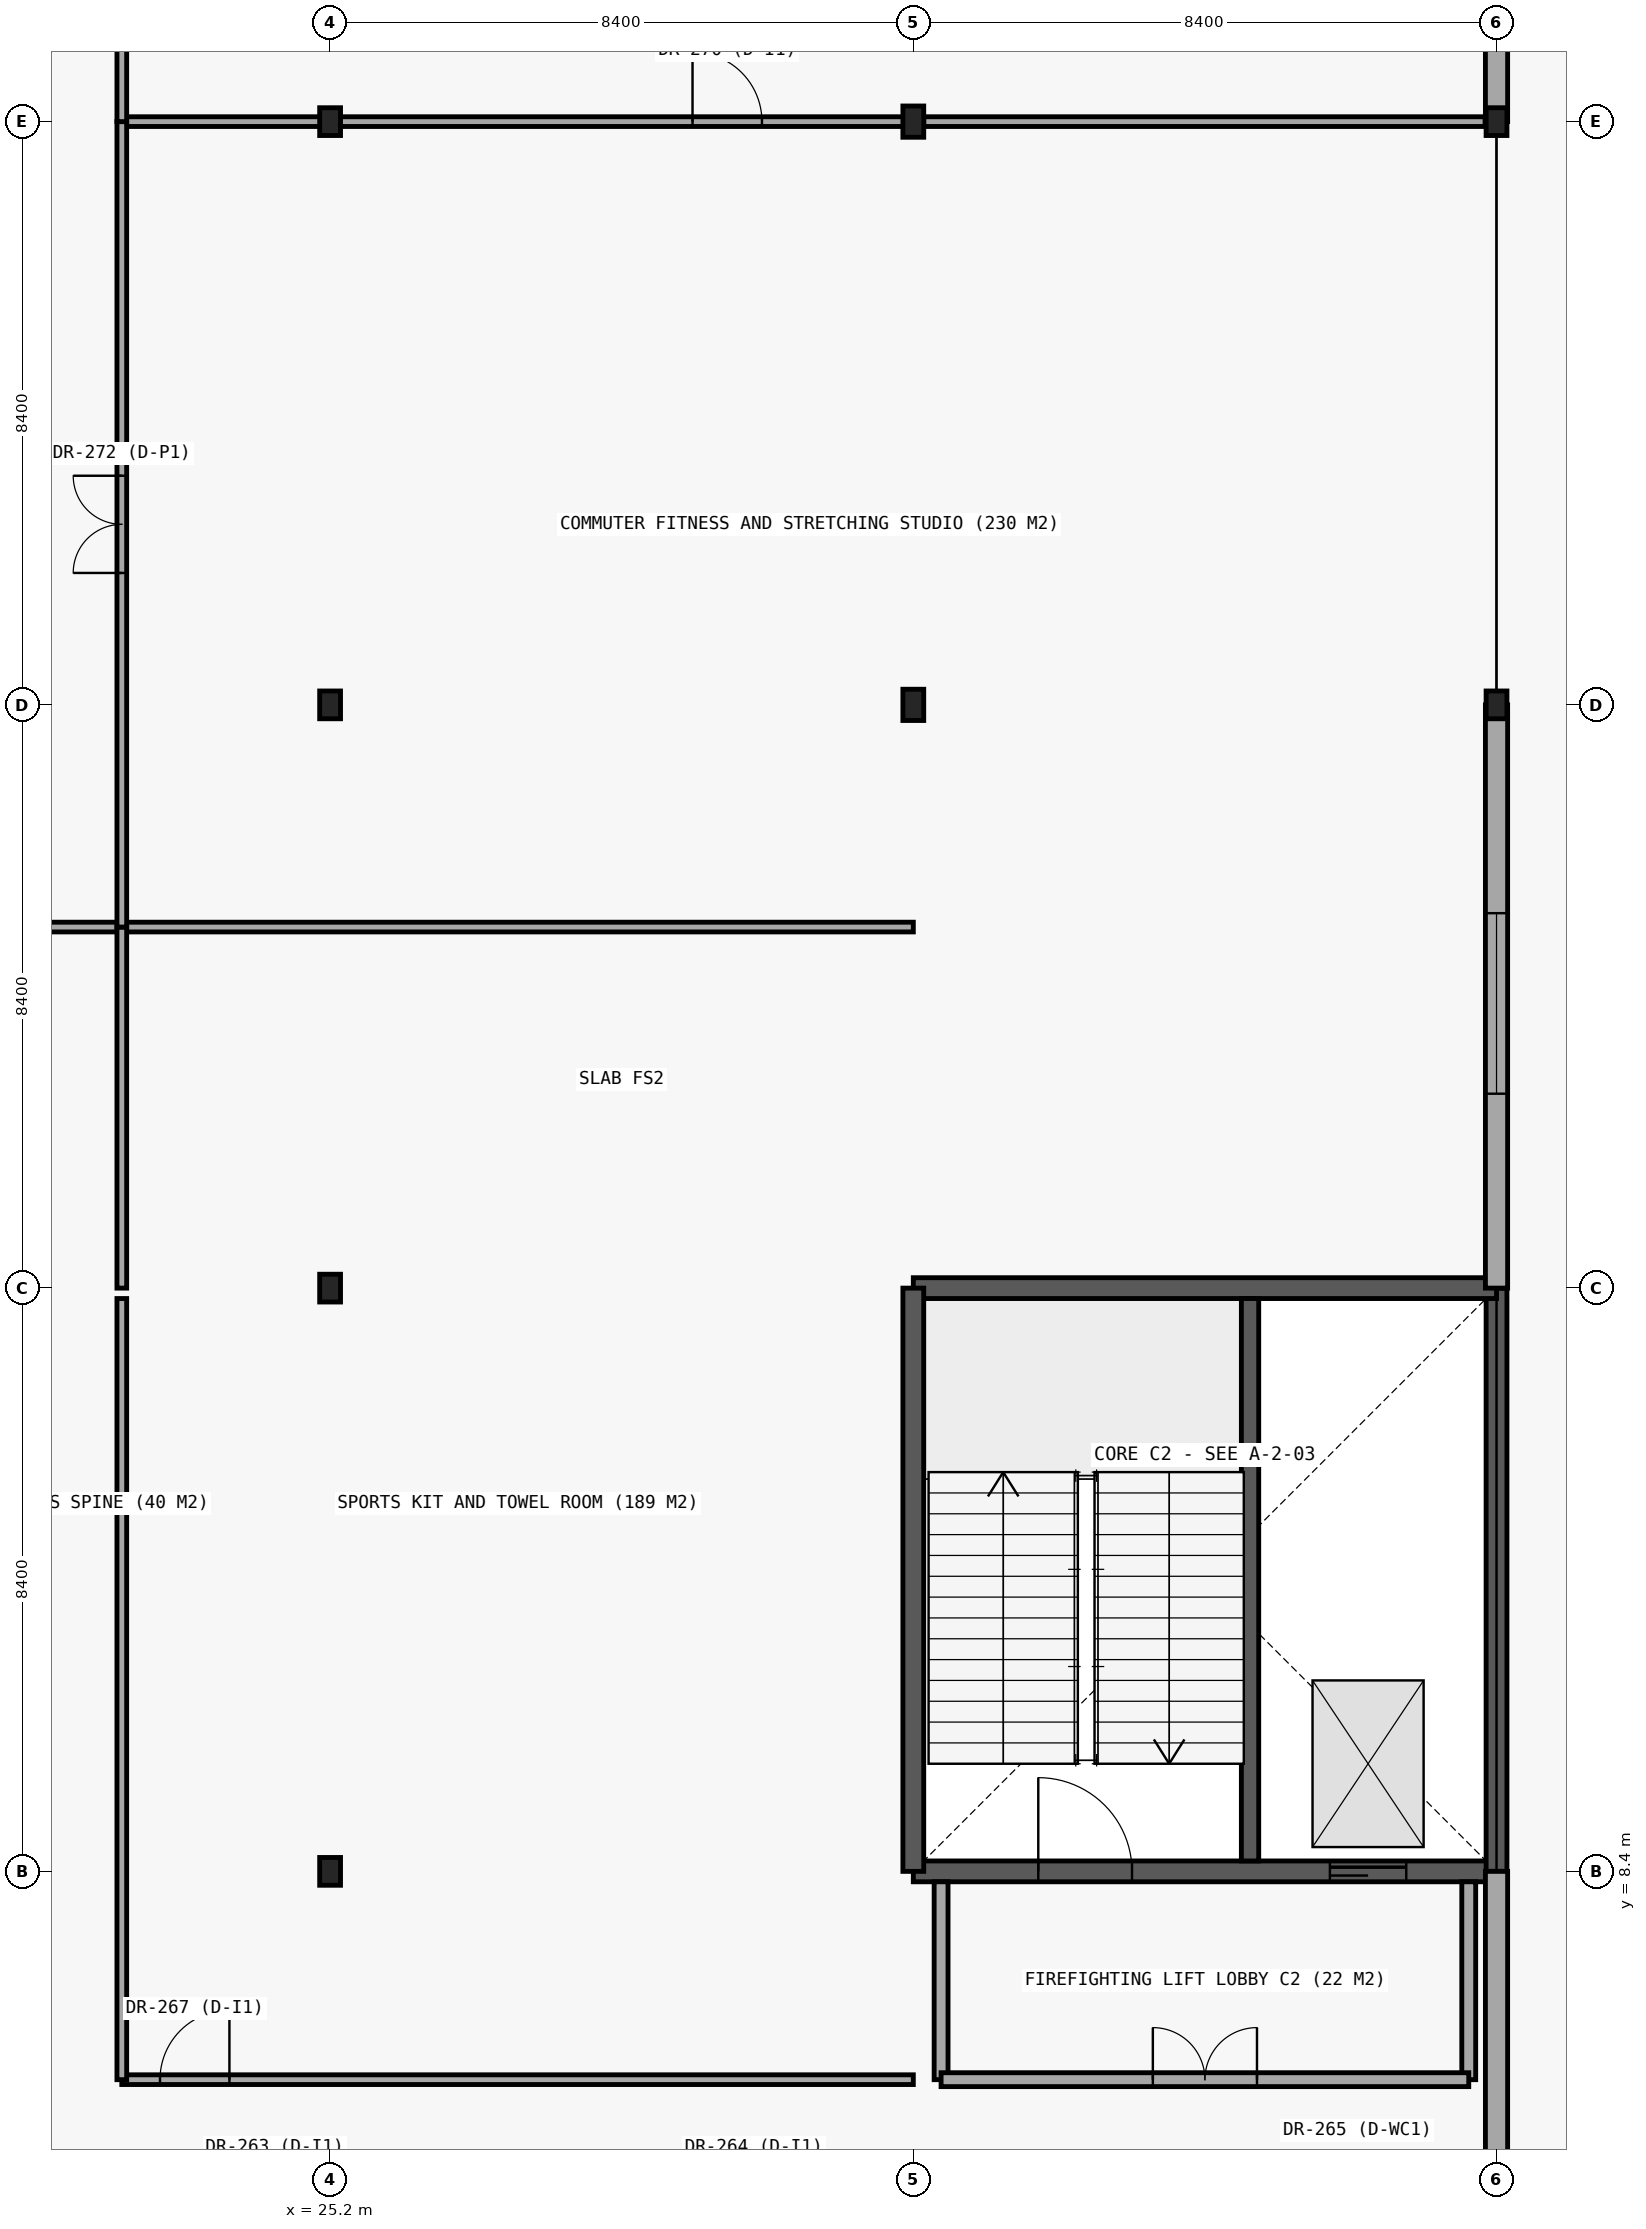
"""IFC4 building model, lengths in metres.
Left out: names, types, materials, properties, quantities, classifications, styles, units other than length and angle.
Written with IfcOpenShell. Run it as: python <this file> out.ifc"""

import sys

from ifc_helpers import new_model, si_unit, direction, frame, frame_2d, origin, origin_2d, place, context, subcontext, project, spatial, rectangle, i_section, extrude, element, fill, save


model = new_model("IFC4")
c1 = context("Model", 3, precision=1e-05, world=origin(), true_north=direction((0.0, 1.0)))
c2 = subcontext(c1, "Body", "Model", "MODEL_VIEW")
j1 = project(units=[si_unit("LENGTHUNIT", "METRE"), si_unit("PLANEANGLEUNIT", "RADIAN")], contexts=[c1])
p1 = place(None, origin())
s1 = spatial("IfcSite", under=j1, at=p1, CompositionType="ELEMENT")
p2 = place(p1, origin())
s2 = spatial("IfcBuilding", under=s1, at=p2, CompositionType="ELEMENT")
p3 = place(p2, frame((0.0, 0.0, 21.6)))
s3 = spatial("IfcBuildingStorey", under=s2, at=p3, CompositionType="ELEMENT", Elevation=21.6)
p4 = place(p3, frame((33.6, 8.4, 0.0), z_axis=(0.0, 0.0, 1.0), x_axis=(1.0, 0.0, 0.0)))
e1 = element("IfcWall", 1, at=p4, inside=s3, PredefinedType="SHEAR", context=c2, shape_type="SweptSolid", body=[
    extrude(rectangle(XDim=8.4, YDim=0.3, at=frame_2d((4.2, 0.0))), origin(), (0.0, 0.0, 1.0), 4.8),
])
p5 = place(p4, frame((1.8, 0.0, 0.0)))
e2 = element("IfcOpeningElement", 2, at=p5, cuts=e1, PredefinedType="OPENING", context=c2, shape_type="SweptSolid", body=[
    extrude(rectangle(XDim=1.35, YDim=2.2, at=frame_2d((0.675, 1.1))), frame((0.0, 0.16, 0.0), z_axis=(0.0, -1.0, 0.0), x_axis=(1.0, 0.0, 0.0)), (0.0, 0.0, 1.0), 0.32),
])
p6 = place(p4, frame((6.0, 0.0, 0.0)))
e3 = element("IfcOpeningElement", 3, at=p6, cuts=e1, PredefinedType="OPENING", context=c2, shape_type="SweptSolid", body=[
    extrude(rectangle(XDim=1.1, YDim=2.2, at=frame_2d((0.55, 1.1))), frame((0.0, 0.16, 0.0), z_axis=(0.0, -1.0, 0.0), x_axis=(1.0, 0.0, 0.0)), (0.0, 0.0, 1.0), 0.32),
])
p7 = place(p3, frame((42.0, 8.4, 0.0), z_axis=(0.0, 0.0, 1.0), x_axis=(0.0, 1.0, 0.0)))
e4 = element("IfcWall", 4, at=p7, inside=s3, PredefinedType="SHEAR", context=c2, shape_type="SweptSolid", body=[
    extrude(rectangle(XDim=8.4, YDim=0.3, at=frame_2d((4.2, 0.0))), origin(), (0.0, 0.0, 1.0), 4.8),
])
p8 = place(p3, frame((42.0, 16.8, 0.0), z_axis=(0.0, 0.0, 1.0), x_axis=(-1.0, 0.0, 0.0)))
e5 = element("IfcWall", 5, at=p8, inside=s3, PredefinedType="SHEAR", context=c2, shape_type="SweptSolid", body=[
    extrude(rectangle(XDim=8.4, YDim=0.3, at=frame_2d((4.2, 0.0))), origin(), (0.0, 0.0, 1.0), 4.8),
])
p9 = place(p3, frame((33.6, 16.8, 0.0), z_axis=(0.0, 0.0, 1.0), x_axis=(0.0, -1.0, 0.0)))
e6 = element("IfcWall", 6, at=p9, inside=s3, PredefinedType="SHEAR", context=c2, shape_type="SweptSolid", body=[
    extrude(rectangle(XDim=8.4, YDim=0.3, at=frame_2d((4.2, 0.0))), origin(), (0.0, 0.0, 1.0), 4.8),
])
p10 = place(p3, frame((38.45, 8.55, 0.0), z_axis=(0.0, 0.0, 1.0), x_axis=(0.0, 1.0, 0.0)))
e7 = element("IfcWall", 7, at=p10, inside=s3, PredefinedType="SHEAR", context=c2, shape_type="SweptSolid", body=[
    extrude(rectangle(XDim=8.1, YDim=0.25, at=frame_2d((4.05, 0.0))), origin(), (0.0, 0.0, 1.0), 4.8),
])
for number, where, z_axis, x_axis in (
    (8, (25.2, 8.4, 0.0), (0.0, 0.0, 1.0), (1.0, 0.0, 0.0)),
    (9, (25.2, 16.8, 0.0), (0.0, 0.0, 1.0), (1.0, 0.0, 0.0)),
    (10, (25.2, 25.2, 0.0), (0.0, 0.0, 1.0), (1.0, 0.0, 0.0)),
    (11, (25.2, 33.6, 0.0), (0.0, 0.0, 1.0), (1.0, 0.0, 0.0)),
):
    element("IfcColumn", number, at=place(p3, frame(where, z_axis=z_axis, x_axis=x_axis)), inside=s3, PredefinedType="COLUMN", context=c2, shape_type="SweptSolid", body=[
        extrude(i_section(OverallWidth=0.3, OverallDepth=0.4, WebThickness=0.013, FlangeThickness=0.024, FilletRadius=0.027, at=origin_2d()), origin(), (0.0, 0.0, 1.0), 4.8),
    ])
for number, where, z_axis, x_axis in (
    (12, (33.6, 25.2, 0.0), (0.0, 0.0, 1.0), (1.0, 0.0, 0.0)),
    (13, (33.6, 33.6, 0.0), (0.0, 0.0, 1.0), (1.0, 0.0, 0.0)),
):
    element("IfcColumn", number, at=place(p3, frame(where, z_axis=z_axis, x_axis=x_axis)), inside=s3, PredefinedType="COLUMN", context=c2, shape_type="SweptSolid", body=[
        extrude(i_section(OverallWidth=0.3, OverallDepth=0.45, WebThickness=0.014, FlangeThickness=0.026, FilletRadius=0.027, at=origin_2d()), origin(), (0.0, 0.0, 1.0), 4.8),
    ])
for number, where, z_axis, x_axis in (
    (14, (42.0, 25.2, 0.0), (0.0, 0.0, 1.0), (1.0, 0.0, 0.0)),
    (15, (42.0, 33.6, 0.0), (0.0, 0.0, 1.0), (1.0, 0.0, 0.0)),
):
    element("IfcColumn", number, at=place(p3, frame(where, z_axis=z_axis, x_axis=x_axis)), inside=s3, PredefinedType="COLUMN", context=c2, shape_type="SweptSolid", body=[
        extrude(i_section(OverallWidth=0.3, OverallDepth=0.4, WebThickness=0.013, FlangeThickness=0.024, FilletRadius=0.027, at=origin_2d()), origin(), (0.0, 0.0, 1.0), 4.8),
    ])
p11 = place(p3, frame((42.0, 0.0, 0.0), z_axis=(0.0, 0.0, 1.0), x_axis=(0.0, 1.0, 0.0)))
e16 = element("IfcWall", 16, at=p11, inside=s3, PredefinedType="STANDARD", context=c2, shape_type="SweptSolid", body=[
    extrude(rectangle(XDim=8.4, YDim=0.32, at=frame_2d((4.2, 0.0))), origin(), (0.0, 0.0, 1.0), 4.22),
])
p12 = place(p11, frame((0.55, 0.0, 0.7)))
e17 = element("IfcOpeningElement", 17, at=p12, cuts=e16, PredefinedType="OPENING", context=c2, shape_type="SweptSolid", body=[
    extrude(rectangle(XDim=2.6, YDim=2.4, at=frame_2d((1.3, 1.2))), frame((0.0, 0.17, 0.0), z_axis=(0.0, -1.0, 0.0), x_axis=(1.0, 0.0, 0.0)), (0.0, 0.0, 1.0), 0.34),
])
p13 = place(p3, frame((42.0, 16.8, 0.0), z_axis=(0.0, 0.0, 1.0), x_axis=(0.0, 1.0, 0.0)))
e18 = element("IfcWall", 18, at=p13, inside=s3, PredefinedType="STANDARD", context=c2, shape_type="SweptSolid", body=[
    extrude(rectangle(XDim=8.4, YDim=0.32, at=frame_2d((4.2, 0.0))), origin(), (0.0, 0.0, 1.0), 4.22),
])
p14 = place(p13, frame((2.8, 0.0, 0.7)))
e19 = element("IfcOpeningElement", 19, at=p14, cuts=e18, PredefinedType="OPENING", context=c2, shape_type="SweptSolid", body=[
    extrude(rectangle(XDim=2.6, YDim=2.4, at=frame_2d((1.3, 1.2))), frame((0.0, 0.17, 0.0), z_axis=(0.0, -1.0, 0.0), x_axis=(1.0, 0.0, 0.0)), (0.0, 0.0, 1.0), 0.34),
])
p15 = place(p3, frame((42.0, 33.6, 0.0), z_axis=(0.0, 0.0, 1.0), x_axis=(0.0, 1.0, 0.0)))
e20 = element("IfcWall", 20, at=p15, inside=s3, PredefinedType="STANDARD", context=c2, shape_type="SweptSolid", body=[
    extrude(rectangle(XDim=8.4, YDim=0.32, at=frame_2d((4.2, 0.0))), origin(), (0.0, 0.0, 1.0), 4.22),
])
p16 = place(p15, frame((3.5, 0.0, 0.0)))
e21 = element("IfcOpeningElement", 21, at=p16, cuts=e20, PredefinedType="OPENING", context=c2, shape_type="SweptSolid", body=[
    extrude(rectangle(XDim=1.28, YDim=2.26, at=frame_2d((0.64, 1.13))), frame((0.0, 0.17, 0.0), z_axis=(0.0, -1.0, 0.0), x_axis=(1.0, 0.0, 0.0)), (0.0, 0.0, 1.0), 0.34),
])
p17 = place(p3, frame((34.0, 5.4, 0.0), z_axis=(0.0, 0.0, 1.0), x_axis=(0.0, 1.0, 0.0)))
e22 = element("IfcWall", 22, at=p17, inside=s3, PredefinedType="PARTITIONING", context=c2, shape_type="SweptSolid", body=[
    extrude(rectangle(XDim=2.85, YDim=0.2, at=frame_2d((1.425, 0.0))), origin(), (0.0, 0.0, 1.0), 4.0),
])
p18 = place(p3, frame((41.6, 5.4, 0.0), z_axis=(0.0, 0.0, 1.0), x_axis=(0.0, 1.0, 0.0)))
e23 = element("IfcWall", 23, at=p18, inside=s3, PredefinedType="PARTITIONING", context=c2, shape_type="SweptSolid", body=[
    extrude(rectangle(XDim=2.85, YDim=0.2, at=frame_2d((1.425, 0.0))), origin(), (0.0, 0.0, 1.0), 4.12),
])
p19 = place(p3, frame((34.0, 5.4, 0.0), z_axis=(0.0, 0.0, 1.0), x_axis=(1.0, 0.0, 0.0)))
e24 = element("IfcWall", 24, at=p19, inside=s3, PredefinedType="PARTITIONING", context=c2, shape_type="SweptSolid", body=[
    extrude(rectangle(XDim=7.6, YDim=0.2, at=frame_2d((3.8, 0.0))), origin(), (0.0, 0.0, 1.0), 4.12),
])
p20 = place(p19, frame((3.05, 0.0, 0.0)))
e25 = element("IfcOpeningElement", 25, at=p20, cuts=e24, PredefinedType="OPENING", context=c2, shape_type="SweptSolid", body=[
    extrude(rectangle(XDim=1.5, YDim=2.2, at=frame_2d((0.75, 1.1))), frame((0.0, 0.11, 0.0), z_axis=(0.0, -1.0, 0.0), x_axis=(1.0, 0.0, 0.0)), (0.0, 0.0, 1.0), 0.22),
])
p21 = place(p3, frame((22.2, 5.4, 0.0), z_axis=(0.0, 0.0, 1.0), x_axis=(1.0, 0.0, 0.0)))
e26 = element("IfcWall", 26, at=p21, inside=s3, PredefinedType="PARTITIONING", context=c2, shape_type="SweptSolid", body=[
    extrude(rectangle(XDim=11.4, YDim=0.14, at=frame_2d((5.7, 0.0))), origin(), (0.0, 0.0, 1.0), 4.1),
])
p22 = place(p21, frame((0.55, 0.0, 0.0)))
e27 = element("IfcOpeningElement", 27, at=p22, cuts=e26, PredefinedType="OPENING", context=c2, shape_type="SweptSolid", body=[
    extrude(rectangle(XDim=1.0, YDim=2.15, at=frame_2d((0.5, 1.075))), frame((0.0, 0.08, 0.0), z_axis=(0.0, -1.0, 0.0), x_axis=(1.0, 0.0, 0.0)), (0.0, 0.0, 1.0), 0.16),
])
p23 = place(p3, frame((19.8, 22.0, 0.0), z_axis=(0.0, 0.0, 1.0), x_axis=(1.0, 0.0, 0.0)))
e28 = element("IfcWall", 28, at=p23, inside=s3, PredefinedType="PARTITIONING", context=c2, shape_type="SweptSolid", body=[
    extrude(rectangle(XDim=2.4, YDim=0.14, at=frame_2d((1.2, 0.0))), origin(), (0.0, 0.0, 1.0), 4.1),
])
p24 = place(p3, frame((22.2, 22.0, 0.0), z_axis=(0.0, 0.0, 1.0), x_axis=(1.0, 0.0, 0.0)))
e29 = element("IfcWall", 29, at=p24, inside=s3, PredefinedType="PARTITIONING", context=c2, shape_type="SweptSolid", body=[
    extrude(rectangle(XDim=11.4, YDim=0.14, at=frame_2d((5.7, 0.0))), origin(), (0.0, 0.0, 1.0), 4.1),
])
p25 = place(p3, frame((22.2, 33.6, 0.0), z_axis=(0.0, 0.0, 1.0), x_axis=(1.0, 0.0, 0.0)))
e30 = element("IfcWall", 30, at=p25, inside=s3, PredefinedType="PARTITIONING", context=c2, shape_type="SweptSolid", body=[
    extrude(rectangle(XDim=11.4, YDim=0.14, at=frame_2d((5.7, 0.0))), origin(), (0.0, 0.0, 1.0), 4.1),
])
p26 = place(p25, frame((8.22, 0.0, 0.0)))
e31 = element("IfcOpeningElement", 31, at=p26, cuts=e30, PredefinedType="OPENING", context=c2, shape_type="SweptSolid", body=[
    extrude(rectangle(XDim=1.0, YDim=2.15, at=frame_2d((0.5, 1.075))), frame((0.0, 0.08, 0.0), z_axis=(0.0, -1.0, 0.0), x_axis=(1.0, 0.0, 0.0)), (0.0, 0.0, 1.0), 0.16),
])
p27 = place(p3, frame((33.75, 33.6, 0.0), z_axis=(0.0, 0.0, 1.0), x_axis=(1.0, 0.0, 0.0)))
e32 = element("IfcWall", 32, at=p27, inside=s3, PredefinedType="PARTITIONING", context=c2, shape_type="SweptSolid", body=[
    extrude(rectangle(XDim=8.085, YDim=0.14, at=frame_2d((4.042, 0.0))), origin(), (0.0, 0.0, 1.0), 4.1),
])
p28 = place(p3, frame((22.2, 5.4, 0.0), z_axis=(0.0, 0.0, 1.0), x_axis=(0.0, 1.0, 0.0)))
e33 = element("IfcWall", 33, at=p28, inside=s3, PredefinedType="PARTITIONING", context=c2, shape_type="SweptSolid", body=[
    extrude(rectangle(XDim=11.25, YDim=0.14, at=frame_2d((5.625, 0.0))), origin(), (0.0, 0.0, 1.0), 4.1),
])
p29 = place(p3, frame((22.2, 16.8, 0.0), z_axis=(0.0, 0.0, 1.0), x_axis=(0.0, 1.0, 0.0)))
e34 = element("IfcWall", 34, at=p29, inside=s3, PredefinedType="PARTITIONING", context=c2, shape_type="SweptSolid", body=[
    extrude(rectangle(XDim=5.2, YDim=0.14, at=frame_2d((2.6, 0.0))), origin(), (0.0, 0.0, 1.0), 4.1),
])
p30 = place(p3, frame((22.2, 22.0, 0.0), z_axis=(0.0, 0.0, 1.0), x_axis=(0.0, 1.0, 0.0)))
e35 = element("IfcWall", 35, at=p30, inside=s3, PredefinedType="PARTITIONING", context=c2, shape_type="SweptSolid", body=[
    extrude(rectangle(XDim=11.6, YDim=0.14, at=frame_2d((5.8, 0.0))), origin(), (0.0, 0.0, 1.0), 4.1),
])
p31 = place(p30, frame((5.1, 0.0, 0.0)))
e36 = element("IfcOpeningElement", 36, at=p31, cuts=e35, PredefinedType="OPENING", context=c2, shape_type="SweptSolid", body=[
    extrude(rectangle(XDim=1.4, YDim=2.25, at=frame_2d((0.7, 1.125))), frame((0.0, 0.08, 0.0), z_axis=(0.0, -1.0, 0.0), x_axis=(1.0, 0.0, 0.0)), (0.0, 0.0, 1.0), 0.16),
])
p32 = place(p3, frame((22.2, 33.6, 0.0), z_axis=(0.0, 0.0, 1.0), x_axis=(0.0, 1.0, 0.0)))
e37 = element("IfcWall", 37, at=p32, inside=s3, PredefinedType="PARTITIONING", context=c2, shape_type="SweptSolid", body=[
    extrude(rectangle(XDim=8.355, YDim=0.14, at=frame_2d((4.177, 0.0))), origin(), (0.0, 0.0, 1.0), 4.1),
])
p33 = place(p14, origin())
e38 = element("IfcWindow", 38, at=p33, inside=s3, PartitioningType="SINGLE_PANEL", PredefinedType="WINDOW", context=c2, shape_type="SweptSolid", body=[
    extrude(rectangle(XDim=2.6, YDim=2.4, at=frame_2d((1.3, 1.2))), frame((0.0, 0.03, 0.0), z_axis=(0.0, -1.0, 0.0), x_axis=(1.0, 0.0, 0.0)), (0.0, 0.0, 1.0), 0.06),
])
fill(e19, e38)
p34 = place(p5, origin())
e39 = element("IfcDoor", 39, at=p34, inside=s3, OperationType="SINGLE_SWING_LEFT", PredefinedType="DOOR", context=c2, shape_type="SweptSolid", body=[
    extrude(rectangle(XDim=1.35, YDim=2.2, at=frame_2d((0.675, 1.1))), frame((0.0, 0.025, 0.0), z_axis=(0.0, -1.0, 0.0), x_axis=(1.0, 0.0, 0.0)), (0.0, 0.0, 1.0), 0.05),
])
fill(e2, e39)
p35 = place(p6, origin())
e40 = element("IfcDoor", 40, at=p35, inside=s3, OperationType="SLIDING_TO_LEFT", PredefinedType="DOOR", context=c2, shape_type="SweptSolid", body=[
    extrude(rectangle(XDim=1.1, YDim=2.2, at=frame_2d((0.55, 1.1))), frame((0.0, 0.025, 0.0), z_axis=(0.0, -1.0, 0.0), x_axis=(1.0, 0.0, 0.0)), (0.0, 0.0, 1.0), 0.05),
])
fill(e3, e40)
p36 = place(p20, origin())
e41 = element("IfcDoor", 41, at=p36, inside=s3, OperationType="DOUBLE_DOOR_SINGLE_SWING", PredefinedType="DOOR", context=c2, shape_type="SweptSolid", body=[
    extrude(rectangle(XDim=1.5, YDim=2.2, at=frame_2d((0.75, 1.1))), frame((0.0, 0.025, 0.0), z_axis=(0.0, -1.0, 0.0), x_axis=(1.0, 0.0, 0.0)), (0.0, 0.0, 1.0), 0.05),
])
fill(e25, e41)
p37 = place(p22, origin())
e42 = element("IfcDoor", 42, at=p37, inside=s3, OperationType="SINGLE_SWING_RIGHT", PredefinedType="DOOR", context=c2, shape_type="SweptSolid", body=[
    extrude(rectangle(XDim=1.0, YDim=2.15, at=frame_2d((0.5, 1.075))), frame((0.0, 0.025, 0.0), z_axis=(0.0, -1.0, 0.0), x_axis=(1.0, 0.0, 0.0)), (0.0, 0.0, 1.0), 0.05),
])
fill(e27, e42)
p38 = place(p26, origin())
e43 = element("IfcDoor", 43, at=p38, inside=s3, OperationType="SINGLE_SWING_LEFT", PredefinedType="DOOR", context=c2, shape_type="SweptSolid", body=[
    extrude(rectangle(XDim=1.0, YDim=2.15, at=frame_2d((0.5, 1.075))), frame((0.0, 0.025, 0.0), z_axis=(0.0, -1.0, 0.0), x_axis=(1.0, 0.0, 0.0)), (0.0, 0.0, 1.0), 0.05),
])
fill(e31, e43)
p39 = place(p31, origin())
e44 = element("IfcDoor", 44, at=p39, inside=s3, OperationType="DOUBLE_DOOR_SINGLE_SWING", PredefinedType="DOOR", context=c2, shape_type="SweptSolid", body=[
    extrude(rectangle(XDim=1.4, YDim=2.25, at=frame_2d((0.7, 1.125))), frame((0.0, 0.025, 0.0), z_axis=(0.0, -1.0, 0.0), x_axis=(1.0, 0.0, 0.0)), (0.0, 0.0, 1.0), 0.05),
])
fill(e36, e44)
save(model, sys.argv[1])
